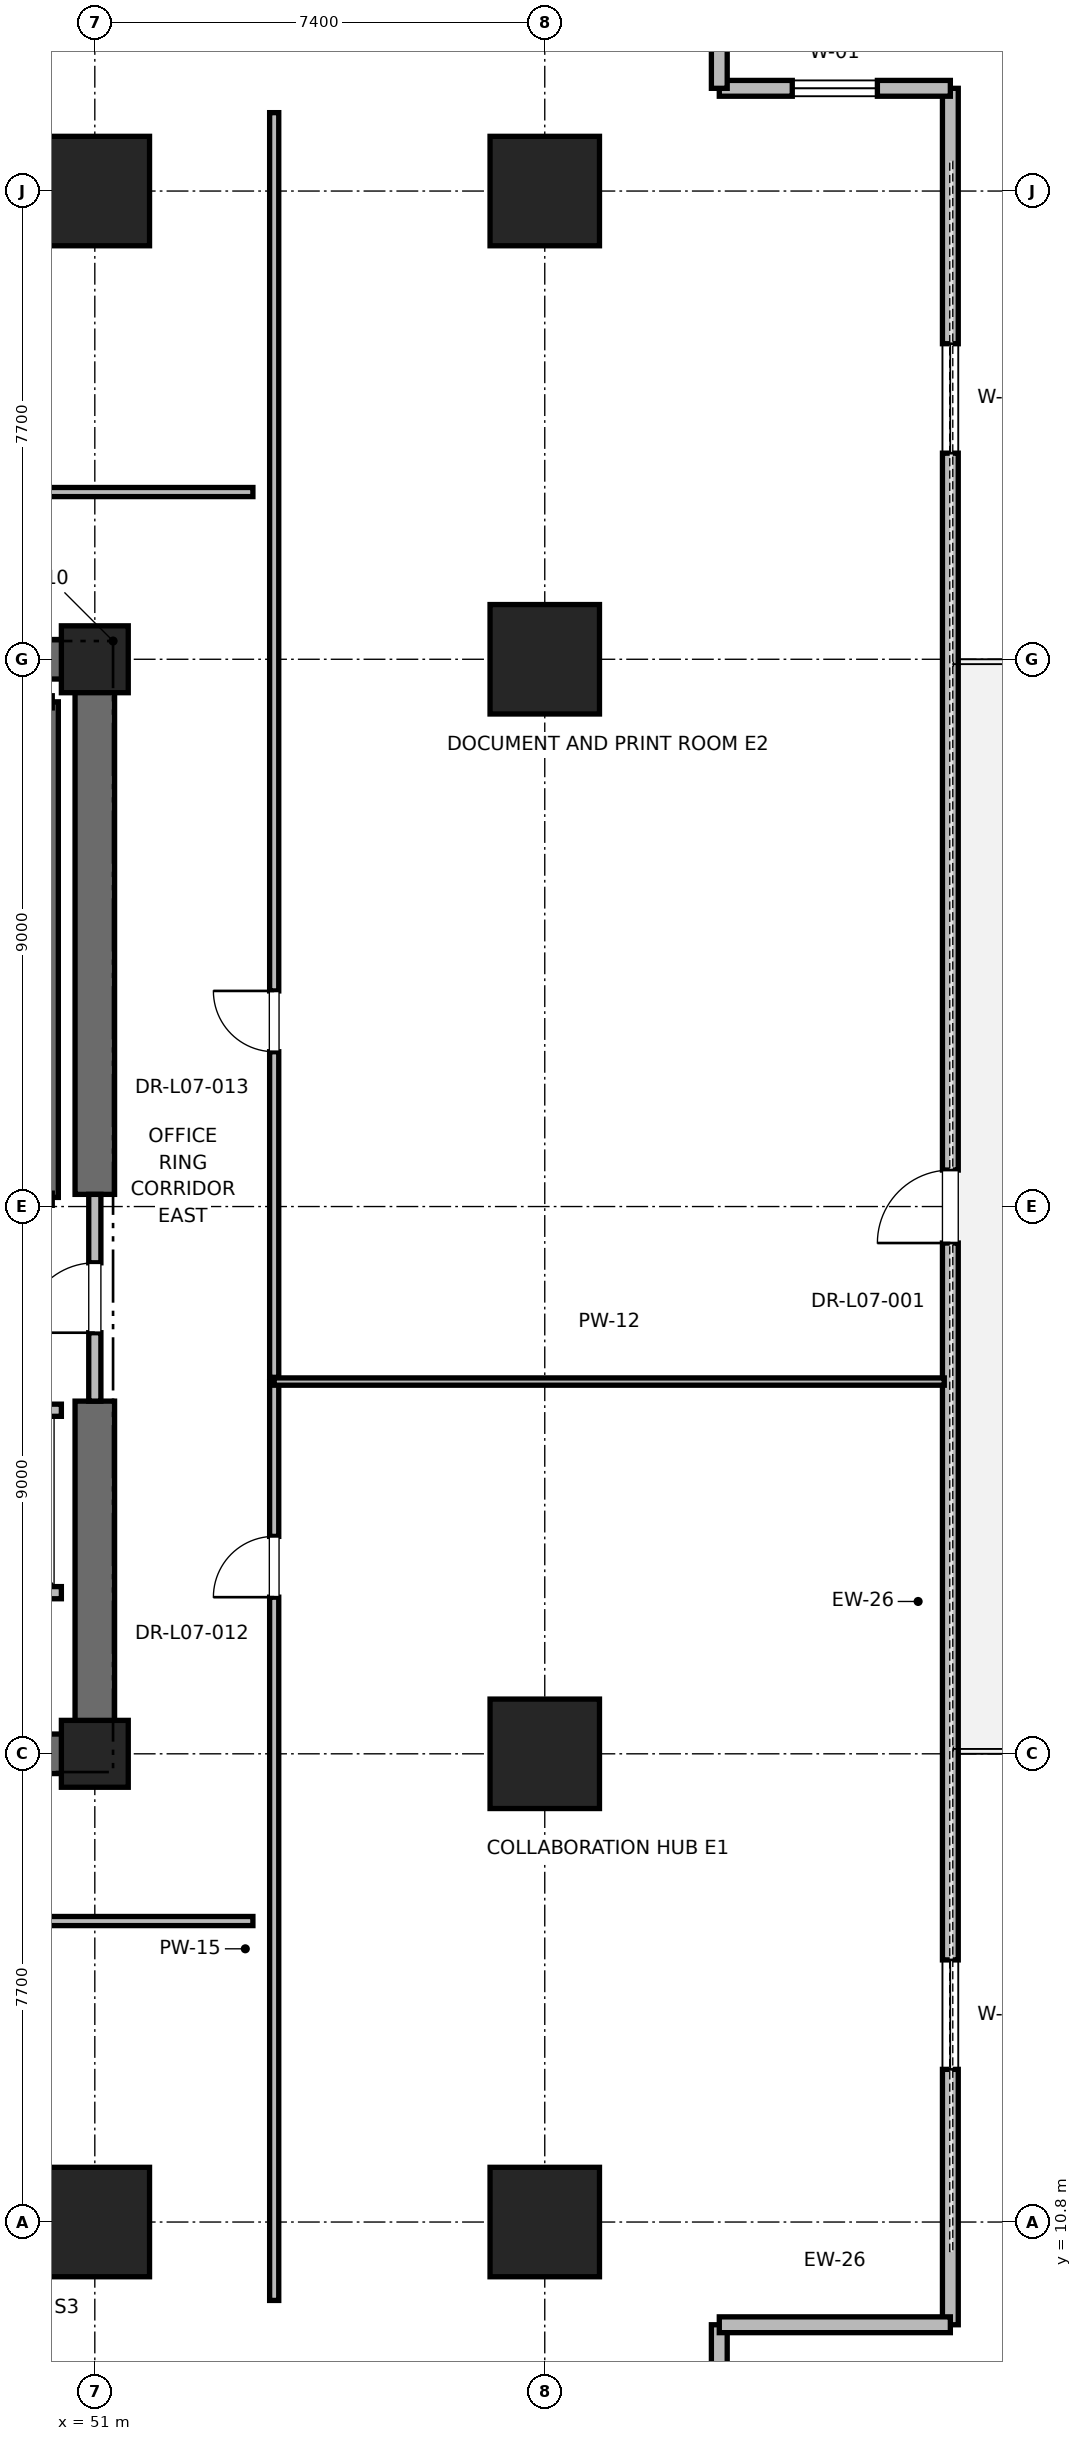
"""IFC4 building model, lengths in metres.
Left out: names, types, materials, properties, quantities, classifications, styles, units other than length and angle.
Written with IfcOpenShell. Run it as: python <this file> out.ifc"""

import sys

from ifc_helpers import new_model, si_unit, direction, frame, frame_2d, origin, origin_2d, place, context, subcontext, project, spatial, rectangle, extrude, element, fill, save


model = new_model("IFC4")
c1 = context("Model", 3, precision=1e-05, world=origin(), true_north=direction((0.0, 1.0)))
c2 = subcontext(c1, "Body", "Model", "MODEL_VIEW")
j1 = project(units=[si_unit("LENGTHUNIT", "METRE"), si_unit("PLANEANGLEUNIT", "RADIAN")], contexts=[c1])
p1 = place(None, origin())
s1 = spatial("IfcSite", under=j1, at=p1, CompositionType="ELEMENT")
p2 = place(p1, origin())
s2 = spatial("IfcBuilding", under=s1, at=p2, CompositionType="ELEMENT")
p3 = place(p2, frame((0.0, 0.0, 35.6)))
s3 = spatial("IfcBuildingStorey", under=s2, at=p3, CompositionType="ELEMENT", Elevation=35.6)
for number, where, z_axis, x_axis in (
    (1, (51.0, 10.8, 0.0), (0.0, 0.0, 1.0), (1.0, 0.0, 0.0)),
    (2, (51.0, 44.2, 0.0), (0.0, 0.0, 1.0), (1.0, 0.0, 0.0)),
    (3, (58.4, 18.5, 0.0), (0.0, 0.0, 1.0), (1.0, 0.0, 0.0)),
    (4, (58.4, 36.5, 0.0), (0.0, 0.0, 1.0), (1.0, 0.0, 0.0)),
    (5, (58.4, 10.8, 0.0), (0.0, 0.0, 1.0), (1.0, 0.0, 0.0)),
    (6, (58.4, 44.2, 0.0), (0.0, 0.0, 1.0), (1.0, 0.0, 0.0)),
):
    element("IfcColumn", number, at=place(p3, frame(where, z_axis=z_axis, x_axis=x_axis)), inside=s3, PredefinedType="COLUMN", context=c2, shape_type="SweptSolid", body=[
        extrude(rectangle(XDim=1.8, YDim=1.8, at=origin_2d()), origin(), (0.0, 0.0, 1.0), 4.0),
    ])
for number, where, z_axis, x_axis in (
    (7, (51.0, 18.5, 0.0), (0.0, 0.0, 1.0), (1.0, 0.0, 0.0)),
    (8, (51.0, 36.5, 0.0), (0.0, 0.0, 1.0), (1.0, 0.0, 0.0)),
):
    element("IfcColumn", number, at=place(p3, frame(where, z_axis=z_axis, x_axis=x_axis)), inside=s3, PredefinedType="PILASTER", context=c2, shape_type="SweptSolid", body=[
        extrude(rectangle(XDim=1.1, YDim=1.1, at=origin_2d()), origin(), (0.0, 0.0, 1.0), 4.0),
    ])
p4 = place(p3, frame((41.8, 18.5, 0.0), z_axis=(0.0, 0.0, 1.0), x_axis=(1.0, 0.0, 0.0)))
e9 = element("IfcWall", 9, at=p4, inside=s3, PredefinedType="SHEAR", context=c2, shape_type="SweptSolid", body=[
    extrude(rectangle(XDim=9.2, YDim=0.65, at=frame_2d((4.6, 0.0))), origin(), (0.0, 0.0, 1.0), 3.76),
])
for number, where, z_axis, x_axis in (
    (10, (45.2, 36.5, 0.0), (0.0, 0.0, 1.0), (1.0, 0.0, 0.0)),
    (11, (51.0, 18.5, 0.0), (0.0, 0.0, 1.0), (0.0, 1.0, 0.0)),
):
    element("IfcWall", number, at=place(p3, frame(where, z_axis=z_axis, x_axis=x_axis)), inside=s3, PredefinedType="SHEAR", context=c2, shape_type="SweptSolid", body=[
        extrude(rectangle(XDim=5.8, YDim=0.65, at=frame_2d((2.9, 0.0))), origin(), (0.0, 0.0, 1.0), 3.76),
    ])
p5 = place(p3, frame((51.0, 27.7, 0.0), z_axis=(0.0, 0.0, 1.0), x_axis=(0.0, 1.0, 0.0)))
e12 = element("IfcWall", 12, at=p5, inside=s3, PredefinedType="SHEAR", context=c2, shape_type="SweptSolid", body=[
    extrude(rectangle(XDim=8.8, YDim=0.65, at=frame_2d((4.4, 0.0))), origin(), (0.0, 0.0, 1.0), 3.76),
])
p6 = place(p3, frame((65.07, 9.111, 0.0), z_axis=(0.0, 0.0, 1.0), x_axis=(0.0, 1.0, 0.0)))
e13 = element("IfcWall", 13, at=p6, inside=s3, PredefinedType="PARAPET", context=c2, shape_type="SweptSolid", body=[
    extrude(rectangle(XDim=36.779, YDim=0.26, at=frame_2d((18.389, 0.0))), origin(), (0.0, 0.0, 1.0), 2.889),
])
p7 = place(p6, frame((4.2, 0.0, 0.85)))
e14 = element("IfcOpeningElement", 14, at=p7, cuts=e13, PredefinedType="OPENING", context=c2, shape_type="SweptSolid", body=[
    extrude(rectangle(XDim=1.8, YDim=2.2, at=frame_2d((0.9, 1.1))), frame((0.0, 0.13, 0.0), z_axis=(0.0, -1.0, 0.0), x_axis=(1.0, 0.0, 0.0)), (0.0, 0.0, 1.0), 0.26),
])
p8 = place(p6, frame((17.789, 0.0, 0.0)))
e15 = element("IfcOpeningElement", 15, at=p8, cuts=e13, PredefinedType="OPENING", context=c2, shape_type="SweptSolid", body=[
    extrude(rectangle(XDim=1.2, YDim=2.2, at=frame_2d((0.6, 1.1))), frame((0.0, 0.13, 0.0), z_axis=(0.0, -1.0, 0.0), x_axis=(1.0, 0.0, 0.0)), (0.0, 0.0, 1.0), 0.26),
])
p9 = place(p6, frame((30.779, 0.0, 0.85)))
e16 = element("IfcOpeningElement", 16, at=p9, cuts=e13, PredefinedType="OPENING", context=c2, shape_type="SweptSolid", body=[
    extrude(rectangle(XDim=1.8, YDim=2.2, at=frame_2d((0.9, 1.1))), frame((0.0, 0.13, 0.0), z_axis=(0.0, -1.0, 0.0), x_axis=(1.0, 0.0, 0.0)), (0.0, 0.0, 1.0), 0.26),
])
p10 = place(p3, frame((61.271, 5.711, 0.0), z_axis=(0.0, 0.0, 1.0), x_axis=(0.0, 1.0, 0.0)))
e17 = element("IfcWall", 17, at=p10, inside=s3, PredefinedType="PARAPET", context=c2, shape_type="SweptSolid", body=[
    extrude(rectangle(XDim=3.4, YDim=0.26, at=frame_2d((1.7, 0.0))), origin(), (0.0, 0.0, 1.0), 3.76),
])
p11 = place(p10, frame((1.0, 0.0, 0.85)))
e18 = element("IfcOpeningElement", 18, at=p11, cuts=e17, PredefinedType="OPENING", context=c2, shape_type="SweptSolid", body=[
    extrude(rectangle(XDim=1.4, YDim=2.0, at=frame_2d((0.7, 1.0))), frame((0.0, 0.13, 0.0), z_axis=(0.0, -1.0, 0.0), x_axis=(1.0, 0.0, 0.0)), (0.0, 0.0, 1.0), 0.26),
])
p12 = place(p3, frame((61.271, 9.111, 0.0), z_axis=(0.0, 0.0, 1.0), x_axis=(1.0, 0.0, 0.0)))
e19 = element("IfcWall", 19, at=p12, inside=s3, PredefinedType="PARAPET", context=c2, shape_type="SweptSolid", body=[
    extrude(rectangle(XDim=3.8, YDim=0.26, at=frame_2d((1.9, 0.0))), origin(), (0.0, 0.0, 1.0), 3.76),
])
p13 = place(p3, frame((65.07, 45.889, 0.0), z_axis=(0.0, 0.0, 1.0), x_axis=(-1.0, 0.0, 0.0)))
e20 = element("IfcWall", 20, at=p13, inside=s3, PredefinedType="PARAPET", context=c2, shape_type="SweptSolid", body=[
    extrude(rectangle(XDim=3.8, YDim=0.26, at=frame_2d((1.9, 0.0))), origin(), (0.0, 0.0, 1.0), 3.76),
])
p14 = place(p13, frame((1.2, 0.0, 0.85)))
e21 = element("IfcOpeningElement", 21, at=p14, cuts=e20, PredefinedType="OPENING", context=c2, shape_type="SweptSolid", body=[
    extrude(rectangle(XDim=1.4, YDim=2.0, at=frame_2d((0.7, 1.0))), frame((0.0, 0.13, 0.0), z_axis=(0.0, -1.0, 0.0), x_axis=(1.0, 0.0, 0.0)), (0.0, 0.0, 1.0), 0.26),
])
p15 = place(p3, frame((61.271, 45.889, 0.0), z_axis=(0.0, 0.0, 1.0), x_axis=(0.0, 1.0, 0.0)))
e22 = element("IfcWall", 22, at=p15, inside=s3, PredefinedType="PARAPET", context=c2, shape_type="SweptSolid", body=[
    extrude(rectangle(XDim=3.4, YDim=0.26, at=frame_2d((1.7, 0.0))), origin(), (0.0, 0.0, 1.0), 3.76),
])
p16 = place(p3, frame((50.3, 27.65, 0.0), z_axis=(0.0, 0.0, 1.0), x_axis=(0.0, 1.0, 0.0)))
e23 = element("IfcWall", 23, at=p16, inside=s3, PredefinedType="SOLIDWALL", context=c2, shape_type="SweptSolid", body=[
    extrude(rectangle(XDim=8.15, YDim=0.2, at=frame_2d((4.075, 0.0))), origin(), (0.0, 0.0, 1.0), 3.76),
])
p17 = place(p3, frame((51.0, 24.3, 0.0), z_axis=(0.0, 0.0, 1.0), x_axis=(0.0, 1.0, 0.0)))
e24 = element("IfcWall", 24, at=p17, inside=s3, PredefinedType="PARTITIONING", context=c2, shape_type="SweptSolid", body=[
    extrude(rectangle(XDim=3.4, YDim=0.2, at=frame_2d((1.7, 0.0))), origin(), (0.0, 0.0, 1.0), 2.54),
])
p18 = place(p17, frame((1.125, 0.0, 0.0)))
e25 = element("IfcOpeningElement", 25, at=p18, cuts=e24, PredefinedType="OPENING", context=c2, shape_type="SweptSolid", body=[
    extrude(rectangle(XDim=1.15, YDim=2.2, at=frame_2d((0.575, 1.1))), frame((0.0, 0.1, 0.0), z_axis=(0.0, -1.0, 0.0), x_axis=(1.0, 0.0, 0.0)), (0.0, 0.0, 1.0), 0.2),
])
p19 = place(p3, frame((47.85, 21.15, 0.0), z_axis=(0.0, 0.0, 1.0), x_axis=(1.0, 0.0, 0.0)))
e26 = element("IfcWall", 26, at=p19, inside=s3, PredefinedType="SOLIDWALL", context=c2, shape_type="SweptSolid", body=[
    extrude(rectangle(XDim=2.6, YDim=0.2, at=frame_2d((1.3, 0.0))), origin(), (0.0, 0.0, 1.0), 3.76),
])
p20 = place(p3, frame((50.45, 24.15, 0.0), z_axis=(0.0, 0.0, 1.0), x_axis=(-1.0, 0.0, 0.0)))
e27 = element("IfcWall", 27, at=p20, inside=s3, PredefinedType="SOLIDWALL", context=c2, shape_type="SweptSolid", body=[
    extrude(rectangle(XDim=2.6, YDim=0.2, at=frame_2d((1.3, 0.0))), origin(), (0.0, 0.0, 1.0), 2.54),
])
p21 = place(p20, frame((0.75, 0.0, 0.0)))
e28 = element("IfcOpeningElement", 28, at=p21, cuts=e27, PredefinedType="OPENING", context=c2, shape_type="SweptSolid", body=[
    extrude(rectangle(XDim=1.1, YDim=2.2, at=frame_2d((0.55, 1.1))), frame((0.0, 0.1, 0.0), z_axis=(0.0, -1.0, 0.0), x_axis=(1.0, 0.0, 0.0)), (0.0, 0.0, 1.0), 0.2),
])
p22 = place(p3, frame((38.982, 39.25, 0.0), z_axis=(0.0, 0.0, 1.0), x_axis=(1.0, 0.0, 0.0)))
e29 = element("IfcWall", 29, at=p22, inside=s3, PredefinedType="PARTITIONING", context=c2, shape_type="SweptSolid", body=[
    extrude(rectangle(XDim=14.618, YDim=0.15, at=frame_2d((7.309, 0.0))), origin(), (0.0, 0.0, 1.0), 2.85),
])
p23 = place(p22, frame((6.734, 0.0, 0.0)))
e30 = element("IfcOpeningElement", 30, at=p23, cuts=e29, PredefinedType="OPENING", context=c2, shape_type="SweptSolid", body=[
    extrude(rectangle(XDim=1.05, YDim=2.2, at=frame_2d((0.525, 1.1))), frame((0.0, 0.075, 0.0), z_axis=(0.0, -1.0, 0.0), x_axis=(1.0, 0.0, 0.0)), (0.0, 0.0, 1.0), 0.15),
])
p24 = place(p3, frame((44.966, 15.75, 0.0), z_axis=(0.0, 0.0, 1.0), x_axis=(1.0, 0.0, 0.0)))
e31 = element("IfcWall", 31, at=p24, inside=s3, PredefinedType="PARTITIONING", context=c2, shape_type="SweptSolid", body=[
    extrude(rectangle(XDim=8.634, YDim=0.15, at=frame_2d((4.317, 0.0))), origin(), (0.0, 0.0, 1.0), 2.85),
])
p25 = place(p24, frame((3.767, 0.0, 0.0)))
e32 = element("IfcOpeningElement", 32, at=p25, cuts=e31, PredefinedType="OPENING", context=c2, shape_type="SweptSolid", body=[
    extrude(rectangle(XDim=1.0, YDim=2.15, at=frame_2d((0.5, 1.075))), frame((0.0, 0.075, 0.0), z_axis=(0.0, -1.0, 0.0), x_axis=(1.0, 0.0, 0.0)), (0.0, 0.0, 1.0), 0.15),
])
p26 = place(p3, frame((53.95, 9.511, 0.0), z_axis=(0.0, 0.0, 1.0), x_axis=(0.0, 1.0, 0.0)))
e33 = element("IfcWall", 33, at=p26, inside=s3, PredefinedType="PARTITIONING", context=c2, shape_type="SweptSolid", body=[
    extrude(rectangle(XDim=15.111, YDim=0.15, at=frame_2d((7.555, 0.0))), origin(), (0.0, 0.0, 1.0), 2.85),
])
p27 = place(p26, frame((11.565, 0.0, 0.0)))
e34 = element("IfcOpeningElement", 34, at=p27, cuts=e33, PredefinedType="OPENING", context=c2, shape_type="SweptSolid", body=[
    extrude(rectangle(XDim=1.0, YDim=2.15, at=frame_2d((0.5, 1.075))), frame((0.0, 0.075, 0.0), z_axis=(0.0, -1.0, 0.0), x_axis=(1.0, 0.0, 0.0)), (0.0, 0.0, 1.0), 0.15),
])
p28 = place(p3, frame((53.95, 24.622, 0.0), z_axis=(0.0, 0.0, 1.0), x_axis=(1.0, 0.0, 0.0)))
e35 = element("IfcWall", 35, at=p28, inside=s3, PredefinedType="PARTITIONING", context=c2, shape_type="SweptSolid", body=[
    extrude(rectangle(XDim=11.021, YDim=0.12, at=frame_2d((5.51, 0.0))), origin(), (0.0, 0.0, 1.0), 2.85),
])
p29 = place(p3, frame((53.95, 24.692, 0.0), z_axis=(0.0, 0.0, 1.0), x_axis=(0.0, 1.0, 0.0)))
e36 = element("IfcWall", 36, at=p29, inside=s3, PredefinedType="PARTITIONING", context=c2, shape_type="SweptSolid", body=[
    extrude(rectangle(XDim=20.798, YDim=0.15, at=frame_2d((10.399, 0.0))), origin(), (0.0, 0.0, 1.0), 2.85),
])
p30 = place(p29, frame((5.354, 0.0, 0.0)))
e37 = element("IfcOpeningElement", 37, at=p30, cuts=e36, PredefinedType="OPENING", context=c2, shape_type="SweptSolid", body=[
    extrude(rectangle(XDim=1.0, YDim=2.15, at=frame_2d((0.5, 1.075))), frame((0.0, 0.075, 0.0), z_axis=(0.0, -1.0, 0.0), x_axis=(1.0, 0.0, 0.0)), (0.0, 0.0, 1.0), 0.15),
])
p31 = place(p7, origin())
e38 = element("IfcWindow", 38, at=p31, inside=s3, PartitioningType="SINGLE_PANEL", PredefinedType="WINDOW", context=c2, shape_type="SweptSolid", body=[
    extrude(rectangle(XDim=1.8, YDim=2.2, at=frame_2d((0.9, 1.1))), frame((0.0, 0.03, 0.0), z_axis=(0.0, -1.0, 0.0), x_axis=(1.0, 0.0, 0.0)), (0.0, 0.0, 1.0), 0.06),
])
fill(e14, e38)
p32 = place(p8, origin())
e39 = element("IfcDoor", 39, at=p32, inside=s3, OperationType="SINGLE_SWING_LEFT", PredefinedType="DOOR", context=c2, shape_type="SweptSolid", body=[
    extrude(rectangle(XDim=1.2, YDim=2.2, at=frame_2d((0.6, 1.1))), frame((0.0, 0.025, 0.0), z_axis=(0.0, -1.0, 0.0), x_axis=(1.0, 0.0, 0.0)), (0.0, 0.0, 1.0), 0.05),
])
fill(e15, e39)
p33 = place(p9, origin())
e40 = element("IfcWindow", 40, at=p33, inside=s3, PartitioningType="SINGLE_PANEL", PredefinedType="WINDOW", context=c2, shape_type="SweptSolid", body=[
    extrude(rectangle(XDim=1.8, YDim=2.2, at=frame_2d((0.9, 1.1))), frame((0.0, 0.03, 0.0), z_axis=(0.0, -1.0, 0.0), x_axis=(1.0, 0.0, 0.0)), (0.0, 0.0, 1.0), 0.06),
])
fill(e16, e40)
p34 = place(p14, origin())
e41 = element("IfcWindow", 41, at=p34, inside=s3, PartitioningType="SINGLE_PANEL", PredefinedType="WINDOW", context=c2, shape_type="SweptSolid", body=[
    extrude(rectangle(XDim=1.4, YDim=2.0, at=frame_2d((0.7, 1.0))), frame((0.0, 0.03, 0.0), z_axis=(0.0, -1.0, 0.0), x_axis=(1.0, 0.0, 0.0)), (0.0, 0.0, 1.0), 0.06),
])
fill(e21, e41)
p35 = place(p18, origin())
e42 = element("IfcDoor", 42, at=p35, inside=s3, OperationType="SINGLE_SWING_LEFT", PredefinedType="DOOR", context=c2, shape_type="SweptSolid", body=[
    extrude(rectangle(XDim=1.15, YDim=2.2, at=frame_2d((0.575, 1.1))), frame((0.0, 0.025, 0.0), z_axis=(0.0, -1.0, 0.0), x_axis=(1.0, 0.0, 0.0)), (0.0, 0.0, 1.0), 0.05),
])
fill(e25, e42)
p36 = place(p27, origin())
e43 = element("IfcDoor", 43, at=p36, inside=s3, OperationType="SINGLE_SWING_LEFT", PredefinedType="DOOR", context=c2, shape_type="SweptSolid", body=[
    extrude(rectangle(XDim=1.0, YDim=2.15, at=frame_2d((0.5, 1.075))), frame((0.0, 0.025, 0.0), z_axis=(0.0, -1.0, 0.0), x_axis=(1.0, 0.0, 0.0)), (0.0, 0.0, 1.0), 0.05),
])
fill(e34, e43)
p37 = place(p30, origin())
e44 = element("IfcDoor", 44, at=p37, inside=s3, OperationType="SINGLE_SWING_RIGHT", PredefinedType="DOOR", context=c2, shape_type="SweptSolid", body=[
    extrude(rectangle(XDim=1.0, YDim=2.15, at=frame_2d((0.5, 1.075))), frame((0.0, 0.025, 0.0), z_axis=(0.0, -1.0, 0.0), x_axis=(1.0, 0.0, 0.0)), (0.0, 0.0, 1.0), 0.05),
])
fill(e37, e44)
save(model, sys.argv[1])
